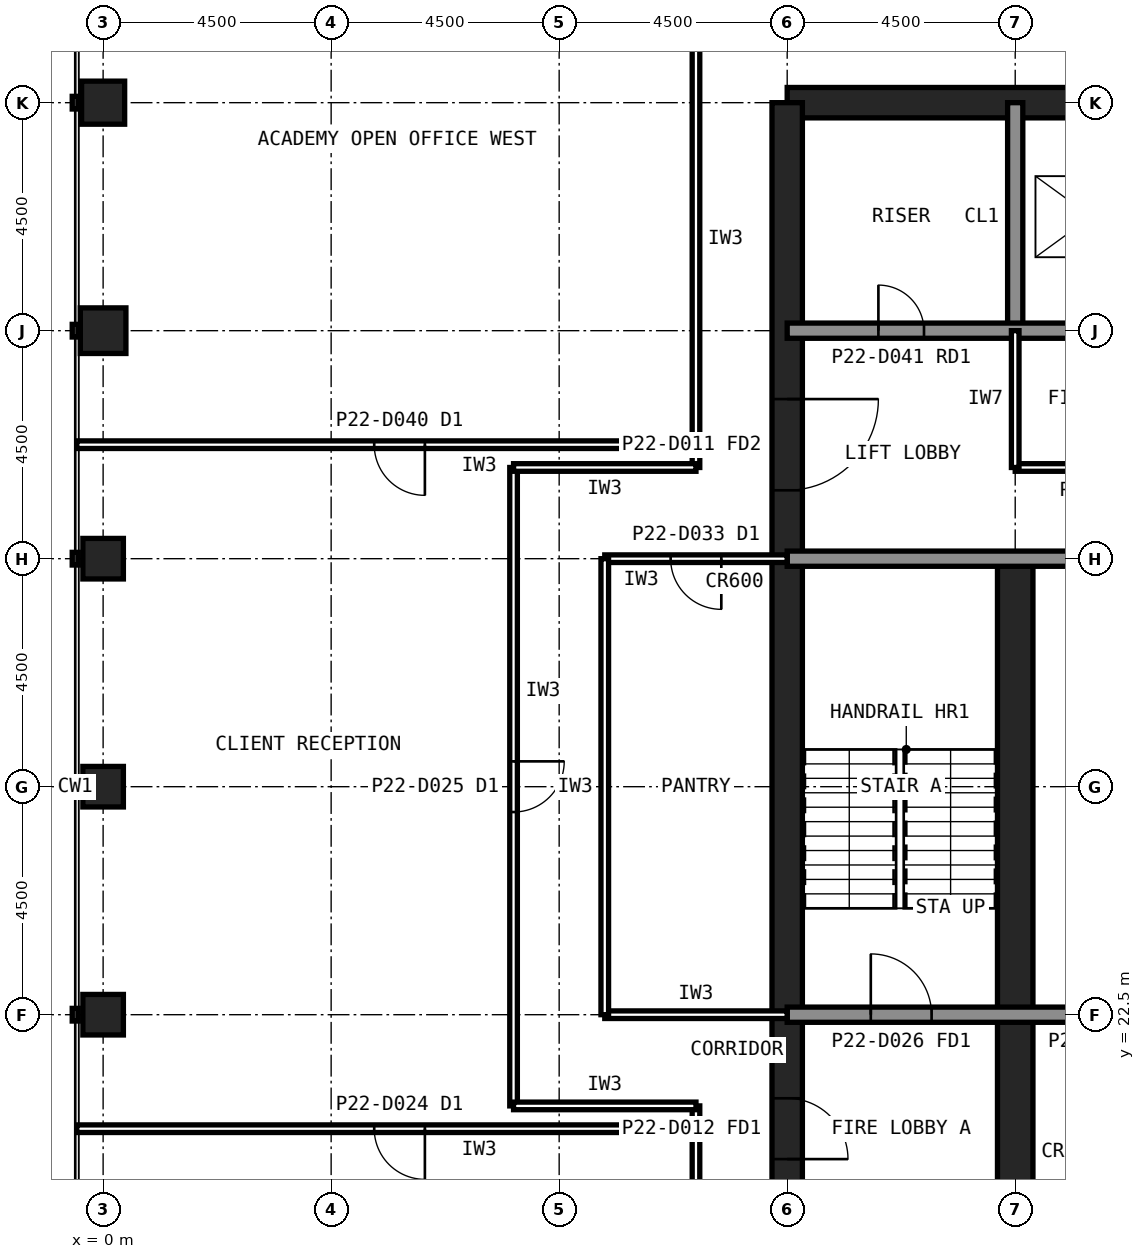
"""IFC4 building model, lengths in metres.
Left out: names, types, materials, properties, quantities, classifications, styles, units other than length and angle.
Written with IfcOpenShell. Run it as: python <this file> out.ifc"""

import sys

from ifc_helpers import new_model, si_unit, direction, frame, frame_2d, origin, origin_2d, place, context, subcontext, project, spatial, rectangle, hollow_rectangle, extrude, element, fill, save


model = new_model("IFC4")
c1 = context("Model", 3, precision=1e-05, world=origin(), true_north=direction((0.0, 1.0)))
c2 = subcontext(c1, "Body", "Model", "MODEL_VIEW")
j1 = project(units=[si_unit("LENGTHUNIT", "METRE"), si_unit("PLANEANGLEUNIT", "RADIAN")], contexts=[c1])
p1 = place(None, origin())
s1 = spatial("IfcSite", under=j1, at=p1, CompositionType="ELEMENT")
p2 = place(p1, origin())
s2 = spatial("IfcBuilding", under=s1, at=p2, CompositionType="ELEMENT")
p3 = place(p2, frame((0.0, 0.0, 96.2)))
s3 = spatial("IfcBuildingStorey", under=s2, at=p3, CompositionType="ELEMENT", Elevation=96.2)
p4 = place(p3, frame((0.0, 40.5, 0.0), z_axis=(0.0, 0.0, 1.0), x_axis=(1.0, 0.0, 0.0)))
e1 = element("IfcColumn", 1, at=p4, inside=s3, PredefinedType="COLUMN", context=c2, shape_type="SweptSolid", body=[
    extrude(hollow_rectangle(XDim=0.85, YDim=0.85, WallThickness=0.05, at=origin_2d()), origin(), (0.0, 0.0, 1.0), 4.2),
])
p5 = place(p3, frame((0.0, 36.0, 0.0), z_axis=(0.0, 0.0, 1.0), x_axis=(1.0, 0.0, 0.0)))
e2 = element("IfcColumn", 2, at=p5, inside=s3, PredefinedType="COLUMN", context=c2, shape_type="SweptSolid", body=[
    extrude(hollow_rectangle(XDim=0.9, YDim=0.9, WallThickness=0.063, at=origin_2d()), origin(), (0.0, 0.0, 1.0), 4.2),
])
for number, where, z_axis, x_axis in (
    (3, (0.0, 31.5, 0.0), (0.0, 0.0, 1.0), (1.0, 0.0, 0.0)),
    (4, (0.0, 27.0, 0.0), (0.0, 0.0, 1.0), (1.0, 0.0, 0.0)),
    (5, (0.0, 22.5, 0.0), (0.0, 0.0, 1.0), (1.0, 0.0, 0.0)),
):
    element("IfcColumn", number, at=place(p3, frame(where, z_axis=z_axis, x_axis=x_axis)), inside=s3, PredefinedType="COLUMN", context=c2, shape_type="SweptSolid", body=[
        extrude(hollow_rectangle(XDim=0.8, YDim=0.8, WallThickness=0.045, at=origin_2d()), origin(), (0.0, 0.0, 1.0), 4.2),
    ])
p6 = place(p3, frame((40.5, 40.5, 0.0), z_axis=(0.0, 0.0, 1.0), x_axis=(-1.0, 0.0, 0.0)))
e6 = element("IfcWall", 6, at=p6, inside=s3, PredefinedType="SHEAR", context=c2, shape_type="SweptSolid", body=[
    extrude(rectangle(XDim=27.0, YDim=0.6, at=frame_2d((13.5, 0.0))), origin(), (0.0, 0.0, 1.0), 4.2),
])
p7 = place(p3, frame((13.5, 40.5, 0.0), z_axis=(0.0, 0.0, 1.0), x_axis=(0.0, -1.0, 0.0)))
e7 = element("IfcWall", 7, at=p7, inside=s3, PredefinedType="SHEAR", context=c2, shape_type="SweptSolid", body=[
    extrude(rectangle(XDim=27.0, YDim=0.6, at=frame_2d((13.5, 0.0))), origin(), (0.0, 0.0, 1.0), 4.2),
])
p8 = place(p7, frame((19.65, 0.0, 0.0)))
e8 = element("IfcOpeningElement", 8, at=p8, cuts=e7, PredefinedType="OPENING", context=c2, shape_type="SweptSolid", body=[
    extrude(rectangle(XDim=1.2, YDim=2.1, at=frame_2d((0.6, 1.05))), frame((0.0, 0.31, 0.0), z_axis=(0.0, -1.0, 0.0), x_axis=(1.0, 0.0, 0.0)), (0.0, 0.0, 1.0), 0.62),
])
p9 = place(p7, frame((5.85, 0.0, 0.0)))
e9 = element("IfcOpeningElement", 9, at=p9, cuts=e7, PredefinedType="OPENING", context=c2, shape_type="SweptSolid", body=[
    extrude(rectangle(XDim=1.8, YDim=2.1, at=frame_2d((0.9, 1.05))), frame((0.0, 0.31, 0.0), z_axis=(0.0, -1.0, 0.0), x_axis=(1.0, 0.0, 0.0)), (0.0, 0.0, 1.0), 0.62),
])
p10 = place(p3, frame((18.0, 13.5, 0.0), z_axis=(0.0, 0.0, 1.0), x_axis=(0.0, 1.0, 0.0)))
e10 = element("IfcWall", 10, at=p10, inside=s3, PredefinedType="SHEAR", context=c2, shape_type="SweptSolid", body=[
    extrude(rectangle(XDim=18.0, YDim=0.7, at=frame_2d((9.0, 0.0))), origin(), (0.0, 0.0, 1.0), 4.2),
])
p11 = place(p3, frame((18.0, 36.0, 0.0), z_axis=(0.0, 0.0, 1.0), x_axis=(0.0, 1.0, 0.0)))
e11 = element("IfcWall", 11, at=p11, inside=s3, PredefinedType="SOLIDWALL", context=c2, shape_type="SweptSolid", body=[
    extrude(rectangle(XDim=4.5, YDim=0.3, at=frame_2d((2.25, 0.0))), origin(), (0.0, 0.0, 1.0), 4.04),
])
p12 = place(p3, frame((13.5, 36.0, 0.0), z_axis=(0.0, 0.0, 1.0), x_axis=(1.0, 0.0, 0.0)))
e12 = element("IfcWall", 12, at=p12, inside=s3, PredefinedType="SOLIDWALL", context=c2, shape_type="SweptSolid", body=[
    extrude(rectangle(XDim=27.0, YDim=0.3, at=frame_2d((13.5, 0.0))), origin(), (0.0, 0.0, 1.0), 4.04),
])
p13 = place(p12, frame((1.8, 0.0, 0.0)))
e13 = element("IfcOpeningElement", 13, at=p13, cuts=e12, PredefinedType="OPENING", context=c2, shape_type="SweptSolid", body=[
    extrude(rectangle(XDim=0.9, YDim=2.1, at=frame_2d((0.45, 1.05))), frame((0.0, 0.16, 0.0), z_axis=(0.0, -1.0, 0.0), x_axis=(1.0, 0.0, 0.0)), (0.0, 0.0, 1.0), 0.32),
])
p14 = place(p12, frame((24.1, 0.0, 0.0)))
e14 = element("IfcOpeningElement", 14, at=p14, cuts=e12, PredefinedType="OPENING", context=c2, shape_type="SweptSolid", body=[
    extrude(rectangle(XDim=1.3, YDim=2.2, at=frame_2d((0.65, 1.1))), frame((0.0, 0.16, 0.0), z_axis=(0.0, -1.0, 0.0), x_axis=(1.0, 0.0, 0.0)), (0.0, 0.0, 1.0), 0.32),
])
p15 = place(p3, frame((13.5, 22.5, 0.0), z_axis=(0.0, 0.0, 1.0), x_axis=(1.0, 0.0, 0.0)))
e15 = element("IfcWall", 15, at=p15, inside=s3, PredefinedType="SOLIDWALL", context=c2, shape_type="SweptSolid", body=[
    extrude(rectangle(XDim=27.0, YDim=0.3, at=frame_2d((13.5, 0.0))), origin(), (0.0, 0.0, 1.0), 4.04),
])
p16 = place(p15, frame((1.65, 0.0, 0.0)))
e16 = element("IfcOpeningElement", 16, at=p16, cuts=e15, PredefinedType="OPENING", context=c2, shape_type="SweptSolid", body=[
    extrude(rectangle(XDim=1.2, YDim=2.1, at=frame_2d((0.6, 1.05))), frame((0.0, 0.16, 0.0), z_axis=(0.0, -1.0, 0.0), x_axis=(1.0, 0.0, 0.0)), (0.0, 0.0, 1.0), 0.32),
])
p17 = place(p15, frame((6.025, 0.0, 0.0)))
e17 = element("IfcOpeningElement", 17, at=p17, cuts=e15, PredefinedType="OPENING", context=c2, shape_type="SweptSolid", body=[
    extrude(rectangle(XDim=1.0, YDim=2.1, at=frame_2d((0.5, 1.05))), frame((0.0, 0.16, 0.0), z_axis=(0.0, -1.0, 0.0), x_axis=(1.0, 0.0, 0.0)), (0.0, 0.0, 1.0), 0.32),
])
p18 = place(p15, frame((10.525, 0.0, 0.0)))
e18 = element("IfcOpeningElement", 18, at=p18, cuts=e15, PredefinedType="OPENING", context=c2, shape_type="SweptSolid", body=[
    extrude(rectangle(XDim=1.0, YDim=2.1, at=frame_2d((0.5, 1.05))), frame((0.0, 0.16, 0.0), z_axis=(0.0, -1.0, 0.0), x_axis=(1.0, 0.0, 0.0)), (0.0, 0.0, 1.0), 0.32),
])
p19 = place(p15, frame((19.75, 0.0, 0.0)))
e19 = element("IfcOpeningElement", 19, at=p19, cuts=e15, PredefinedType="OPENING", context=c2, shape_type="SweptSolid", body=[
    extrude(rectangle(XDim=1.0, YDim=2.1, at=frame_2d((0.5, 1.05))), frame((0.0, 0.16, 0.0), z_axis=(0.0, -1.0, 0.0), x_axis=(1.0, 0.0, 0.0)), (0.0, 0.0, 1.0), 0.32),
])
p20 = place(p15, frame((15.05, 0.0, 0.0)))
e20 = element("IfcOpeningElement", 20, at=p20, cuts=e15, PredefinedType="OPENING", context=c2, shape_type="SweptSolid", body=[
    extrude(rectangle(XDim=1.4, YDim=2.4, at=frame_2d((0.7, 1.2))), frame((0.0, 0.16, 0.0), z_axis=(0.0, -1.0, 0.0), x_axis=(1.0, 0.0, 0.0)), (0.0, 0.0, 1.0), 0.32),
])
p21 = place(p3, frame((13.5, 31.5, 0.0), z_axis=(0.0, 0.0, 1.0), x_axis=(1.0, 0.0, 0.0)))
e21 = element("IfcWall", 21, at=p21, inside=s3, PredefinedType="SOLIDWALL", context=c2, shape_type="SweptSolid", body=[
    extrude(rectangle(XDim=27.0, YDim=0.3, at=frame_2d((13.5, 0.0))), origin(), (0.0, 0.0, 1.0), 4.04),
])
p22 = place(p21, frame((24.15, 0.0, 0.0)))
e22 = element("IfcOpeningElement", 22, at=p22, cuts=e21, PredefinedType="OPENING", context=c2, shape_type="SweptSolid", body=[
    extrude(rectangle(XDim=1.2, YDim=2.1, at=frame_2d((0.6, 1.05))), frame((0.0, 0.16, 0.0), z_axis=(0.0, -1.0, 0.0), x_axis=(1.0, 0.0, 0.0)), (0.0, 0.0, 1.0), 0.32),
])
p23 = place(p21, frame((15.3, 0.0, 0.0)))
e23 = element("IfcOpeningElement", 23, at=p23, cuts=e21, PredefinedType="OPENING", context=c2, shape_type="SweptSolid", body=[
    extrude(rectangle(XDim=0.9, YDim=2.1, at=frame_2d((0.45, 1.05))), frame((0.0, 0.16, 0.0), z_axis=(0.0, -1.0, 0.0), x_axis=(1.0, 0.0, 0.0)), (0.0, 0.0, 1.0), 0.32),
])
p24 = place(p21, frame((19.8, 0.0, 0.0)))
e24 = element("IfcOpeningElement", 24, at=p24, cuts=e21, PredefinedType="OPENING", context=c2, shape_type="SweptSolid", body=[
    extrude(rectangle(XDim=0.9, YDim=2.1, at=frame_2d((0.45, 1.05))), frame((0.0, 0.16, 0.0), z_axis=(0.0, -1.0, 0.0), x_axis=(1.0, 0.0, 0.0)), (0.0, 0.0, 1.0), 0.32),
])
p25 = place(p3, frame((18.0, 33.3, 0.0), z_axis=(0.0, 0.0, 1.0), x_axis=(1.0, 0.0, 0.0)))
e25 = element("IfcWall", 25, at=p25, inside=s3, PredefinedType="PARTITIONING", context=c2, shape_type="SweptSolid", body=[
    extrude(rectangle(XDim=18.0, YDim=0.15, at=frame_2d((9.0, 0.0))), origin(), (0.0, 0.0, 1.0), 4.04),
])
p26 = place(p25, frame((1.8, 0.0, 0.0)))
e26 = element("IfcOpeningElement", 26, at=p26, cuts=e25, PredefinedType="OPENING", context=c2, shape_type="SweptSolid", body=[
    extrude(rectangle(XDim=0.9, YDim=2.1, at=frame_2d((0.45, 1.05))), frame((0.0, 0.085, 0.0), z_axis=(0.0, -1.0, 0.0), x_axis=(1.0, 0.0, 0.0)), (0.0, 0.0, 1.0), 0.17),
])
p27 = place(p25, frame((7.8, 0.0, 0.0)))
e27 = element("IfcOpeningElement", 27, at=p27, cuts=e25, PredefinedType="OPENING", context=c2, shape_type="SweptSolid", body=[
    extrude(rectangle(XDim=0.9, YDim=2.1, at=frame_2d((0.45, 1.05))), frame((0.0, 0.085, 0.0), z_axis=(0.0, -1.0, 0.0), x_axis=(1.0, 0.0, 0.0)), (0.0, 0.0, 1.0), 0.17),
])
p28 = place(p25, frame((14.55, 0.0, 0.0)))
e28 = element("IfcOpeningElement", 28, at=p28, cuts=e25, PredefinedType="OPENING", context=c2, shape_type="SweptSolid", body=[
    extrude(rectangle(XDim=0.9, YDim=2.1, at=frame_2d((0.45, 1.05))), frame((0.0, 0.085, 0.0), z_axis=(0.0, -1.0, 0.0), x_axis=(1.0, 0.0, 0.0)), (0.0, 0.0, 1.0), 0.17),
])
p29 = place(p3, frame((18.0, 33.3, 0.0), z_axis=(0.0, 0.0, 1.0), x_axis=(0.0, 1.0, 0.0)))
e29 = element("IfcWall", 29, at=p29, inside=s3, PredefinedType="PARTITIONING", context=c2, shape_type="SweptSolid", body=[
    extrude(rectangle(XDim=2.7, YDim=0.15, at=frame_2d((1.35, 0.0))), origin(), (0.0, 0.0, 1.0), 4.04),
])
p30 = place(p3, frame((8.1, 33.3, 0.0), z_axis=(0.0, 0.0, 1.0), x_axis=(0.0, -1.0, 0.0)))
e30 = element("IfcWall", 30, at=p30, inside=s3, PredefinedType="PARTITIONING", context=c2, shape_type="SweptSolid", body=[
    extrude(rectangle(XDim=12.6, YDim=0.15, at=frame_2d((6.3, 0.0))), origin(), (0.0, 0.0, 1.0), 4.04),
])
p31 = place(p30, frame((5.8, 0.0, 0.0)))
e31 = element("IfcOpeningElement", 31, at=p31, cuts=e30, PredefinedType="OPENING", context=c2, shape_type="SweptSolid", body=[
    extrude(rectangle(XDim=1.0, YDim=2.1, at=frame_2d((0.5, 1.05))), frame((0.0, 0.085, 0.0), z_axis=(0.0, -1.0, 0.0), x_axis=(1.0, 0.0, 0.0)), (0.0, 0.0, 1.0), 0.17),
])
p32 = place(p3, frame((11.7, 42.3, 0.0), z_axis=(0.0, 0.0, 1.0), x_axis=(0.0, -1.0, 0.0)))
e32 = element("IfcWall", 32, at=p32, inside=s3, PredefinedType="PARTITIONING", context=c2, shape_type="SweptSolid", body=[
    extrude(rectangle(XDim=9.0, YDim=0.15, at=frame_2d((4.5, 0.0))), origin(), (0.0, 0.0, 1.0), 4.04),
])
p33 = place(p3, frame((11.7, 20.7, 0.0), z_axis=(0.0, 0.0, 1.0), x_axis=(0.0, -1.0, 0.0)))
e33 = element("IfcWall", 33, at=p33, inside=s3, PredefinedType="PARTITIONING", context=c2, shape_type="SweptSolid", body=[
    extrude(rectangle(XDim=7.2, YDim=0.15, at=frame_2d((3.6, 0.0))), origin(), (0.0, 0.0, 1.0), 4.04),
])
for number, where, z_axis, x_axis in (
    (34, (8.1, 20.7, 0.0), (0.0, 0.0, 1.0), (1.0, 0.0, 0.0)),
    (35, (11.7, 33.3, 0.0), (0.0, 0.0, 1.0), (-1.0, 0.0, 0.0)),
):
    element("IfcWall", number, at=place(p3, frame(where, z_axis=z_axis, x_axis=x_axis)), inside=s3, PredefinedType="PARTITIONING", context=c2, shape_type="SweptSolid", body=[
        extrude(rectangle(XDim=3.6, YDim=0.15, at=frame_2d((1.8, 0.0))), origin(), (0.0, 0.0, 1.0), 4.04),
    ])
p34 = place(p3, frame((9.9, 22.5, 0.0), z_axis=(0.0, 0.0, 1.0), x_axis=(1.0, 0.0, 0.0)))
e36 = element("IfcWall", 36, at=p34, inside=s3, PredefinedType="PARTITIONING", context=c2, shape_type="SweptSolid", body=[
    extrude(rectangle(XDim=3.6, YDim=0.15, at=frame_2d((1.8, 0.0))), origin(), (0.0, 0.0, 1.0), 3.189),
])
p35 = place(p3, frame((13.5, 31.5, 0.0), z_axis=(0.0, 0.0, 1.0), x_axis=(-1.0, 0.0, 0.0)))
e37 = element("IfcWall", 37, at=p35, inside=s3, PredefinedType="PARTITIONING", context=c2, shape_type="SweptSolid", body=[
    extrude(rectangle(XDim=3.6, YDim=0.15, at=frame_2d((1.8, 0.0))), origin(), (0.0, 0.0, 1.0), 3.189),
])
p36 = place(p35, frame((1.3, 0.0, 0.0)))
e38 = element("IfcOpeningElement", 38, at=p36, cuts=e37, PredefinedType="OPENING", context=c2, shape_type="SweptSolid", body=[
    extrude(rectangle(XDim=1.0, YDim=2.1, at=frame_2d((0.5, 1.05))), frame((0.0, 0.085, 0.0), z_axis=(0.0, -1.0, 0.0), x_axis=(1.0, 0.0, 0.0)), (0.0, 0.0, 1.0), 0.17),
])
p37 = place(p3, frame((9.9, 31.5, 0.0), z_axis=(0.0, 0.0, 1.0), x_axis=(0.0, -1.0, 0.0)))
e39 = element("IfcWall", 39, at=p37, inside=s3, PredefinedType="PARTITIONING", context=c2, shape_type="SweptSolid", body=[
    extrude(rectangle(XDim=9.0, YDim=0.15, at=frame_2d((4.5, 0.0))), origin(), (0.0, 0.0, 1.0), 4.04),
])
p38 = place(p3, frame((11.7, 33.75, 0.0), z_axis=(0.0, 0.0, 1.0), x_axis=(-1.0, 0.0, 0.0)))
e40 = element("IfcWall", 40, at=p38, inside=s3, PredefinedType="PARTITIONING", context=c2, shape_type="SweptSolid", body=[
    extrude(rectangle(XDim=12.22, YDim=0.15, at=frame_2d((6.11, 0.0))), origin(), (0.0, 0.0, 1.0), 4.04),
])
p39 = place(p38, frame((5.35, 0.0, 0.0)))
e41 = element("IfcOpeningElement", 41, at=p39, cuts=e40, PredefinedType="OPENING", context=c2, shape_type="SweptSolid", body=[
    extrude(rectangle(XDim=1.0, YDim=2.1, at=frame_2d((0.5, 1.05))), frame((0.0, 0.085, 0.0), z_axis=(0.0, -1.0, 0.0), x_axis=(1.0, 0.0, 0.0)), (0.0, 0.0, 1.0), 0.17),
])
p40 = place(p3, frame((11.7, 20.25, 0.0), z_axis=(0.0, 0.0, 1.0), x_axis=(-1.0, 0.0, 0.0)))
e42 = element("IfcWall", 42, at=p40, inside=s3, PredefinedType="PARTITIONING", context=c2, shape_type="SweptSolid", body=[
    extrude(rectangle(XDim=12.22, YDim=0.15, at=frame_2d((6.11, 0.0))), origin(), (0.0, 0.0, 1.0), 4.04),
])
p41 = place(p40, frame((5.35, 0.0, 0.0)))
e43 = element("IfcOpeningElement", 43, at=p41, cuts=e42, PredefinedType="OPENING", context=c2, shape_type="SweptSolid", body=[
    extrude(rectangle(XDim=1.0, YDim=2.1, at=frame_2d((0.5, 1.05))), frame((0.0, 0.085, 0.0), z_axis=(0.0, -1.0, 0.0), x_axis=(1.0, 0.0, 0.0)), (0.0, 0.0, 1.0), 0.17),
])
p42 = place(p8, origin())
e44 = element("IfcDoor", 44, at=p42, inside=s3, OperationType="SINGLE_SWING_RIGHT", PredefinedType="DOOR", context=c2, shape_type="SweptSolid", body=[
    extrude(rectangle(XDim=1.2, YDim=2.1, at=frame_2d((0.6, 1.05))), frame((0.0, 0.025, 0.0), z_axis=(0.0, -1.0, 0.0), x_axis=(1.0, 0.0, 0.0)), (0.0, 0.0, 1.0), 0.05),
])
fill(e8, e44)
p43 = place(p9, origin())
e45 = element("IfcDoor", 45, at=p43, inside=s3, OperationType="SINGLE_SWING_LEFT", PredefinedType="DOOR", context=c2, shape_type="SweptSolid", body=[
    extrude(rectangle(XDim=1.8, YDim=2.1, at=frame_2d((0.9, 1.05))), frame((0.0, 0.025, 0.0), z_axis=(0.0, -1.0, 0.0), x_axis=(1.0, 0.0, 0.0)), (0.0, 0.0, 1.0), 0.05),
])
fill(e9, e45)
p44 = place(p16, origin())
e46 = element("IfcDoor", 46, at=p44, inside=s3, OperationType="SINGLE_SWING_LEFT", PredefinedType="DOOR", context=c2, shape_type="SweptSolid", body=[
    extrude(rectangle(XDim=1.2, YDim=2.1, at=frame_2d((0.6, 1.05))), frame((0.0, 0.025, 0.0), z_axis=(0.0, -1.0, 0.0), x_axis=(1.0, 0.0, 0.0)), (0.0, 0.0, 1.0), 0.05),
])
fill(e16, e46)
p45 = place(p13, origin())
e47 = element("IfcDoor", 47, at=p45, inside=s3, OperationType="SINGLE_SWING_LEFT", PredefinedType="DOOR", context=c2, shape_type="SweptSolid", body=[
    extrude(rectangle(XDim=0.9, YDim=2.1, at=frame_2d((0.45, 1.05))), frame((0.0, 0.025, 0.0), z_axis=(0.0, -1.0, 0.0), x_axis=(1.0, 0.0, 0.0)), (0.0, 0.0, 1.0), 0.05),
])
fill(e13, e47)
p46 = place(p31, origin())
e48 = element("IfcDoor", 48, at=p46, inside=s3, OperationType="SINGLE_SWING_LEFT", PredefinedType="DOOR", context=c2, shape_type="SweptSolid", body=[
    extrude(rectangle(XDim=1.0, YDim=2.1, at=frame_2d((0.5, 1.05))), frame((0.0, 0.025, 0.0), z_axis=(0.0, -1.0, 0.0), x_axis=(1.0, 0.0, 0.0)), (0.0, 0.0, 1.0), 0.05),
])
fill(e31, e48)
p47 = place(p36, origin())
e49 = element("IfcDoor", 49, at=p47, inside=s3, OperationType="SINGLE_SWING_LEFT", PredefinedType="DOOR", context=c2, shape_type="SweptSolid", body=[
    extrude(rectangle(XDim=1.0, YDim=2.1, at=frame_2d((0.5, 1.05))), frame((0.0, 0.025, 0.0), z_axis=(0.0, -1.0, 0.0), x_axis=(1.0, 0.0, 0.0)), (0.0, 0.0, 1.0), 0.05),
])
fill(e38, e49)
p48 = place(p39, origin())
e50 = element("IfcDoor", 50, at=p48, inside=s3, OperationType="SINGLE_SWING_LEFT", PredefinedType="DOOR", context=c2, shape_type="SweptSolid", body=[
    extrude(rectangle(XDim=1.0, YDim=2.1, at=frame_2d((0.5, 1.05))), frame((0.0, 0.025, 0.0), z_axis=(0.0, -1.0, 0.0), x_axis=(1.0, 0.0, 0.0)), (0.0, 0.0, 1.0), 0.05),
])
fill(e41, e50)
p49 = place(p41, origin())
e51 = element("IfcDoor", 51, at=p49, inside=s3, OperationType="SINGLE_SWING_LEFT", PredefinedType="DOOR", context=c2, shape_type="SweptSolid", body=[
    extrude(rectangle(XDim=1.0, YDim=2.1, at=frame_2d((0.5, 1.05))), frame((0.0, 0.025, 0.0), z_axis=(0.0, -1.0, 0.0), x_axis=(1.0, 0.0, 0.0)), (0.0, 0.0, 1.0), 0.05),
])
fill(e43, e51)
save(model, sys.argv[1])
